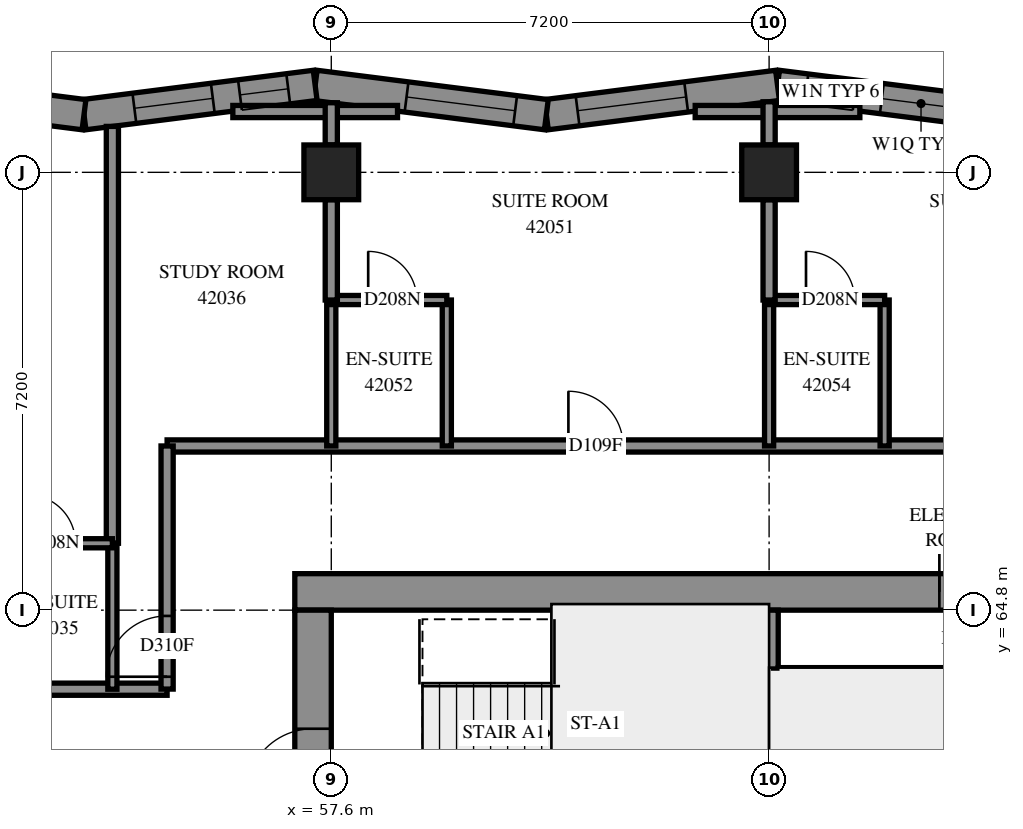
"""IFC4 building model, lengths in metres.
Left out: names, types, materials, properties, quantities, classifications, styles, units other than length and angle.
Written with IfcOpenShell. Run it as: python <this file> out.ifc"""

import sys

from ifc_helpers import new_model, si_unit, direction, frame, frame_2d, origin, origin_2d, place, context, subcontext, project, spatial, polyline, rectangle, outline, extrude, element, fill, save


model = new_model("IFC4")
c1 = context("Model", 3, precision=1e-05, world=origin(), true_north=direction((0.0, 1.0)))
c2 = subcontext(c1, "Body", "Model", "MODEL_VIEW")
j1 = project(units=[si_unit("LENGTHUNIT", "METRE"), si_unit("PLANEANGLEUNIT", "RADIAN")], contexts=[c1])
p1 = place(None, origin())
s1 = spatial("IfcSite", under=j1, at=p1, CompositionType="ELEMENT")
p2 = place(p1, origin())
s2 = spatial("IfcBuilding", under=s1, at=p2, CompositionType="ELEMENT")
p3 = place(p2, frame((0.0, 0.0, 155.8)))
s3 = spatial("IfcBuildingStorey", under=s2, at=p3, CompositionType="ELEMENT", Elevation=155.8)
for number, where, z_axis, x_axis in (
    (1, (57.6, 72.0, 0.0), (0.0, 0.0, 1.0), (1.0, 0.0, 0.0)),
    (2, (64.8, 72.0, 0.0), (0.0, 0.0, 1.0), (1.0, 0.0, 0.0)),
):
    element("IfcColumn", number, at=place(p3, frame(where, z_axis=z_axis, x_axis=x_axis)), inside=s3, PredefinedType="COLUMN", context=c2, shape_type="SweptSolid", body=[
        extrude(rectangle(XDim=0.9, YDim=0.9, at=origin_2d()), origin(), (0.0, 0.0, 1.0), 3.1),
    ])
p4 = place(p3, frame((57.0, 65.1, -0.3), z_axis=(0.0, 0.0, 1.0), x_axis=(1.0, 0.0, 0.0)))
e3 = element("IfcWall", 3, at=p4, inside=s3, PredefinedType="SHEAR", context=c2, shape_type="SweptSolid", body=[
    extrude(rectangle(XDim=15.6, YDim=0.6, at=frame_2d((7.8, 0.0))), origin(), (0.0, 0.0, 1.0), 2.7),
])
p5 = place(p4, frame((10.6, 0.0, 0.3)))
e4 = element("IfcOpeningElement", 4, at=p5, cuts=e3, PredefinedType="OPENING", context=c2, shape_type="SweptSolid", body=[
    extrude(rectangle(XDim=0.8, YDim=2.1, at=frame_2d((0.4, 1.05))), frame((0.0, 0.31, 0.0), z_axis=(0.0, -1.0, 0.0), x_axis=(1.0, 0.0, 0.0)), (0.0, 0.0, 1.0), 0.62),
])
p6 = place(p3, frame((57.3, 50.4, -0.3), z_axis=(0.0, 0.0, 1.0), x_axis=(0.0, 1.0, 0.0)))
e5 = element("IfcWall", 5, at=p6, inside=s3, PredefinedType="SHEAR", context=c2, shape_type="SweptSolid", body=[
    extrude(rectangle(XDim=14.4, YDim=0.6, at=frame_2d((7.2, 0.0))), origin(), (0.0, 0.0, 1.0), 2.7),
])
p7 = place(p6, frame((4.55, 0.0, 0.3)))
e6 = element("IfcOpeningElement", 6, at=p7, cuts=e5, PredefinedType="OPENING", context=c2, shape_type="SweptSolid", body=[
    extrude(rectangle(XDim=1.1, YDim=2.1, at=frame_2d((0.55, 1.05))), frame((0.0, 0.31, 0.0), z_axis=(0.0, -1.0, 0.0), x_axis=(1.0, 0.0, 0.0)), (0.0, 0.0, 1.0), 0.62),
])
p8 = place(p6, frame((11.35, 0.0, 0.3)))
e7 = element("IfcOpeningElement", 7, at=p8, cuts=e5, PredefinedType="OPENING", context=c2, shape_type="SweptSolid", body=[
    extrude(rectangle(XDim=1.1, YDim=2.1, at=frame_2d((0.55, 1.05))), frame((0.0, 0.31, 0.0), z_axis=(0.0, -1.0, 0.0), x_axis=(1.0, 0.0, 0.0)), (0.0, 0.0, 1.0), 0.62),
])
p9 = place(p3, frame((64.8, 60.6, 0.0), z_axis=(0.0, 0.0, 1.0), x_axis=(0.0, 1.0, 0.0)))
e8 = element("IfcWall", 8, at=p9, inside=s3, PredefinedType="SOLIDWALL", context=c2, shape_type="SweptSolid", body=[
    extrude(rectangle(XDim=4.2, YDim=0.3, at=frame_2d((2.1, 0.0))), origin(), (0.0, 0.0, 1.0), 3.1),
])
p10 = place(p3, frame((68.74, 72.948, 0.0), z_axis=(0.0, 0.0, 1.0), x_axis=(-0.9920583495, 0.1257785003, 0.0)))
e9 = element("IfcWall", 9, at=p10, inside=s3, PredefinedType="SOLIDWALL", context=c2, shape_type="SweptSolid", body=[
    extrude(outline(polyline([(0.032, -0.25), (3.864, -0.25), (3.8, 0.25), (-0.032, 0.25), (0.032, -0.25)])), origin(), (0.0, 0.0, 1.0), 3.1),
])
p11 = place(p10, frame((0.803, 0.0, 0.45)))
e10 = element("IfcOpeningElement", 10, at=p11, cuts=e9, PredefinedType="OPENING", context=c2, shape_type="SweptSolid", body=[
    extrude(rectangle(XDim=1.3, YDim=2.5, at=frame_2d((0.65, 1.25))), frame((0.0, 0.26, 0.0), z_axis=(0.0, -1.0, 0.0), x_axis=(1.0, 0.0, 0.0)), (0.0, 0.0, 1.0), 0.52),
])
p12 = place(p10, frame((2.553, 0.0, 0.45)))
e11 = element("IfcOpeningElement", 11, at=p12, cuts=e9, PredefinedType="OPENING", context=c2, shape_type="SweptSolid", body=[
    extrude(rectangle(XDim=0.8, YDim=2.5, at=frame_2d((0.4, 1.25))), frame((0.0, 0.26, 0.0), z_axis=(0.0, -1.0, 0.0), x_axis=(1.0, 0.0, 0.0)), (0.0, 0.0, 1.0), 0.52),
])
p13 = place(p3, frame((64.939, 73.43, 0.0), z_axis=(0.0, 0.0, 1.0), x_axis=(-0.9920583495, -0.1257785003, 0.0)))
e12 = element("IfcWall", 12, at=p13, inside=s3, PredefinedType="SOLIDWALL", context=c2, shape_type="SweptSolid", body=[
    extrude(outline(polyline([(-0.032, -0.25), (3.8, -0.25), (3.864, 0.25), (0.032, 0.25), (-0.032, -0.25)])), origin(), (0.0, 0.0, 1.0), 3.1),
])
p14 = place(p13, frame((1.515, 0.0, 0.7)))
e13 = element("IfcOpeningElement", 13, at=p14, cuts=e12, PredefinedType="OPENING", context=c2, shape_type="SweptSolid", body=[
    extrude(rectangle(XDim=1.8, YDim=2.2, at=frame_2d((0.9, 1.1))), frame((0.0, 0.26, 0.0), z_axis=(0.0, -1.0, 0.0), x_axis=(1.0, 0.0, 0.0)), (0.0, 0.0, 1.0), 0.52),
])
p15 = place(p3, frame((61.137, 72.948, 0.0), z_axis=(0.0, 0.0, 1.0), x_axis=(-0.9920587623, 0.1257752442, 0.0)))
e14 = element("IfcWall", 14, at=p15, inside=s3, PredefinedType="SOLIDWALL", context=c2, shape_type="SweptSolid", body=[
    extrude(outline(polyline([(0.032, -0.25), (3.864, -0.25), (3.8, 0.25), (-0.032, 0.25), (0.032, -0.25)])), origin(), (0.0, 0.0, 1.0), 3.1),
])
p16 = place(p15, frame((0.517, 0.0, 0.7)))
e15 = element("IfcOpeningElement", 15, at=p16, cuts=e14, PredefinedType="OPENING", context=c2, shape_type="SweptSolid", body=[
    extrude(rectangle(XDim=1.8, YDim=2.2, at=frame_2d((0.9, 1.1))), frame((0.0, 0.26, 0.0), z_axis=(0.0, -1.0, 0.0), x_axis=(1.0, 0.0, 0.0)), (0.0, 0.0, 1.0), 0.52),
])
p17 = place(p3, frame((57.335, 73.43, 0.0), z_axis=(0.0, 0.0, 1.0), x_axis=(-0.9920583495, -0.1257785003, 0.0)))
e16 = element("IfcWall", 16, at=p17, inside=s3, PredefinedType="SOLIDWALL", context=c2, shape_type="SweptSolid", body=[
    extrude(outline(polyline([(-0.032, -0.25), (3.8, -0.25), (3.864, 0.25), (0.032, 0.25), (-0.032, -0.25)])), origin(), (0.0, 0.0, 1.0), 3.1),
])
p18 = place(p17, frame((0.447, 0.0, 0.45)))
e17 = element("IfcOpeningElement", 17, at=p18, cuts=e16, PredefinedType="OPENING", context=c2, shape_type="SweptSolid", body=[
    extrude(rectangle(XDim=0.8, YDim=2.5, at=frame_2d((0.4, 1.25))), frame((0.0, 0.26, 0.0), z_axis=(0.0, -1.0, 0.0), x_axis=(1.0, 0.0, 0.0)), (0.0, 0.0, 1.0), 0.52),
])
p19 = place(p17, frame((1.697, 0.0, 0.45)))
e18 = element("IfcOpeningElement", 18, at=p19, cuts=e16, PredefinedType="OPENING", context=c2, shape_type="SweptSolid", body=[
    extrude(rectangle(XDim=1.3, YDim=2.5, at=frame_2d((0.65, 1.25))), frame((0.0, 0.26, 0.0), z_axis=(0.0, -1.0, 0.0), x_axis=(1.0, 0.0, 0.0)), (0.0, 0.0, 1.0), 0.52),
])
p20 = place(p3, frame((53.533, 72.948, 0.0), z_axis=(0.0, 0.0, 1.0), x_axis=(-0.9920583495, 0.1257785003, 0.0)))
e19 = element("IfcWall", 19, at=p20, inside=s3, PredefinedType="SOLIDWALL", context=c2, shape_type="SweptSolid", body=[
    extrude(outline(polyline([(0.032, -0.25), (3.864, -0.25), (3.8, 0.25), (-0.032, 0.25), (0.032, -0.25)])), origin(), (0.0, 0.0, 1.0), 3.1),
])
p21 = place(p20, frame((1.079, 0.0, 0.45)))
e20 = element("IfcOpeningElement", 20, at=p21, cuts=e19, PredefinedType="OPENING", context=c2, shape_type="SweptSolid", body=[
    extrude(rectangle(XDim=1.2, YDim=2.5, at=frame_2d((0.6, 1.25))), frame((0.0, 0.26, 0.0), z_axis=(0.0, -1.0, 0.0), x_axis=(1.0, 0.0, 0.0)), (0.0, 0.0, 1.0), 0.52),
])
p22 = place(p3, frame((64.95, 63.78, 0.0), z_axis=(0.0, 0.0, 1.0), x_axis=(1.0, 0.0, 0.0)))
e21 = element("IfcWall", 21, at=p22, inside=s3, PredefinedType="PARTITIONING", context=c2, shape_type="SweptSolid", body=[
    extrude(rectangle(XDim=6.25, YDim=0.15, at=frame_2d((3.125, 0.0))), origin(), (0.0, 0.0, 1.0), 3.1),
])
p23 = place(p3, frame((54.9, 67.5, 0.0), z_axis=(0.0, 0.0, 1.0), x_axis=(1.0, 0.0, 0.0)))
e22 = element("IfcWall", 22, at=p23, inside=s3, PredefinedType="PARTITIONING", context=c2, shape_type="SweptSolid", body=[
    extrude(rectangle(XDim=19.8, YDim=0.2, at=frame_2d((9.9, 0.0))), origin(), (0.0, 0.0, 1.0), 3.1),
])
p24 = place(p23, frame((6.599, 0.0, 0.0)))
e23 = element("IfcOpeningElement", 23, at=p24, cuts=e22, PredefinedType="OPENING", context=c2, shape_type="SweptSolid", body=[
    extrude(rectangle(XDim=0.9, YDim=2.1, at=frame_2d((0.45, 1.05))), frame((0.0, 0.11, 0.0), z_axis=(0.0, -1.0, 0.0), x_axis=(1.0, 0.0, 0.0)), (0.0, 0.0, 1.0), 0.22),
])
p25 = place(p23, frame((13.799, 0.0, 0.0)))
e24 = element("IfcOpeningElement", 24, at=p25, cuts=e22, PredefinedType="OPENING", context=c2, shape_type="SweptSolid", body=[
    extrude(rectangle(XDim=0.9, YDim=2.1, at=frame_2d((0.45, 1.05))), frame((0.0, 0.11, 0.0), z_axis=(0.0, -1.0, 0.0), x_axis=(1.0, 0.0, 0.0)), (0.0, 0.0, 1.0), 0.22),
])
p26 = place(p3, frame((40.702, 63.5, 0.0), z_axis=(0.0, 0.0, 1.0), x_axis=(1.0, 0.0, 0.0)))
e25 = element("IfcWall", 25, at=p26, inside=s3, PredefinedType="PARTITIONING", context=c2, shape_type="SweptSolid", body=[
    extrude(rectangle(XDim=14.198, YDim=0.2, at=frame_2d((7.099, 0.0))), origin(), (0.0, 0.0, 1.0), 3.1),
])
p27 = place(p26, frame((6.692, 0.0, 0.0)))
e26 = element("IfcOpeningElement", 26, at=p27, cuts=e25, PredefinedType="OPENING", context=c2, shape_type="SweptSolid", body=[
    extrude(rectangle(XDim=0.9, YDim=2.1, at=frame_2d((0.45, 1.05))), frame((0.0, 0.11, 0.0), z_axis=(0.0, -1.0, 0.0), x_axis=(1.0, 0.0, 0.0)), (0.0, 0.0, 1.0), 0.22),
])
p28 = place(p26, frame((10.25, 0.0, 0.0)))
e27 = element("IfcOpeningElement", 27, at=p28, cuts=e25, PredefinedType="OPENING", context=c2, shape_type="SweptSolid", body=[
    extrude(rectangle(XDim=0.9, YDim=2.1, at=frame_2d((0.45, 1.05))), frame((0.0, 0.11, 0.0), z_axis=(0.0, -1.0, 0.0), x_axis=(1.0, 0.0, 0.0)), (0.0, 0.0, 1.0), 0.22),
])
p29 = place(p3, frame((54.0, 65.9, 0.0), z_axis=(0.0, 0.0, 1.0), x_axis=(0.0, 1.0, 0.0)))
e28 = element("IfcWall", 28, at=p29, inside=s3, PredefinedType="PARTITIONING", context=c2, shape_type="SweptSolid", body=[
    extrude(rectangle(XDim=6.855, YDim=0.2, at=frame_2d((3.428, 0.0))), origin(), (0.0, 0.0, 1.0), 3.1),
])
p30 = place(p3, frame((54.9, 63.502, 0.0), z_axis=(0.0, 0.0, 1.0), x_axis=(0.0, 1.0, 0.0)))
e29 = element("IfcWall", 29, at=p30, inside=s3, PredefinedType="PARTITIONING", context=c2, shape_type="SweptSolid", body=[
    extrude(rectangle(XDim=3.998, YDim=0.2, at=frame_2d((1.999, 0.0))), origin(), (0.0, 0.0, 1.0), 3.1),
])
p31 = place(p30, frame((0.203, 0.0, 0.0)))
e30 = element("IfcOpeningElement", 30, at=p31, cuts=e29, PredefinedType="OPENING", context=c2, shape_type="SweptSolid", body=[
    extrude(rectangle(XDim=1.0, YDim=2.1, at=frame_2d((0.5, 1.05))), frame((0.0, 0.11, 0.0), z_axis=(0.0, -1.0, 0.0), x_axis=(1.0, 0.0, 0.0)), (0.0, 0.0, 1.0), 0.22),
])
for number, where, z_axis, x_axis in (
    (31, (63.584, 73.0, 0.0), (0.0, 0.0, 1.0), (1.0, 0.0, 0.0)),
    (32, (55.981, 73.0, 0.0), (0.0, 0.0, 1.0), (1.0, 0.0, 0.0)),
):
    element("IfcWall", number, at=place(p3, frame(where, z_axis=z_axis, x_axis=x_axis)), inside=s3, PredefinedType="PARTITIONING", context=c2, shape_type="SweptSolid", body=[
        extrude(rectangle(XDim=2.708, YDim=0.2, at=frame_2d((1.354, 0.0))), origin(), (0.0, 0.0, 1.0), 3.1),
    ])
for number, where, z_axis, x_axis in (
    (33, (54.0, 63.5, 0.0), (0.0, 0.0, 1.0), (0.0, 1.0, 0.0)),
    (34, (59.5, 67.5, 0.0), (0.0, 0.0, 1.0), (0.0, 1.0, 0.0)),
    (35, (57.6, 67.5, 0.0), (0.0, 0.0, 1.0), (0.0, 1.0, 0.0)),
    (36, (66.7, 67.5, 0.0), (0.0, 0.0, 1.0), (0.0, 1.0, 0.0)),
    (37, (64.8, 67.5, 0.0), (0.0, 0.0, 1.0), (0.0, 1.0, 0.0)),
):
    element("IfcWall", number, at=place(p3, frame(where, z_axis=z_axis, x_axis=x_axis)), inside=s3, PredefinedType="PARTITIONING", context=c2, shape_type="SweptSolid", body=[
        extrude(rectangle(XDim=2.4, YDim=0.15, at=frame_2d((1.2, 0.0))), origin(), (0.0, 0.0, 1.0), 3.1),
    ])
p32 = place(p3, frame((64.8, 69.9, 0.0), z_axis=(0.0, 0.0, 1.0), x_axis=(1.0, 0.0, 0.0)))
e38 = element("IfcWall", 38, at=p32, inside=s3, PredefinedType="PARTITIONING", context=c2, shape_type="SweptSolid", body=[
    extrude(rectangle(XDim=1.9, YDim=0.15, at=frame_2d((0.95, 0.0))), origin(), (0.0, 0.0, 1.0), 3.1),
])
p33 = place(p32, frame((0.607, 0.0, 0.0)))
e39 = element("IfcOpeningElement", 39, at=p33, cuts=e38, PredefinedType="OPENING", context=c2, shape_type="SweptSolid", body=[
    extrude(rectangle(XDim=0.8, YDim=2.1, at=frame_2d((0.4, 1.05))), frame((0.0, 0.085, 0.0), z_axis=(0.0, -1.0, 0.0), x_axis=(1.0, 0.0, 0.0)), (0.0, 0.0, 1.0), 0.17),
])
p34 = place(p3, frame((52.1, 65.9, 0.0), z_axis=(0.0, 0.0, 1.0), x_axis=(1.0, 0.0, 0.0)))
e40 = element("IfcWall", 40, at=p34, inside=s3, PredefinedType="PARTITIONING", context=c2, shape_type="SweptSolid", body=[
    extrude(rectangle(XDim=1.9, YDim=0.15, at=frame_2d((0.95, 0.0))), origin(), (0.0, 0.0, 1.0), 3.1),
])
p35 = place(p34, frame((0.493, 0.0, 0.0)))
e41 = element("IfcOpeningElement", 41, at=p35, cuts=e40, PredefinedType="OPENING", context=c2, shape_type="SweptSolid", body=[
    extrude(rectangle(XDim=0.8, YDim=2.1, at=frame_2d((0.4, 1.05))), frame((0.0, 0.085, 0.0), z_axis=(0.0, -1.0, 0.0), x_axis=(1.0, 0.0, 0.0)), (0.0, 0.0, 1.0), 0.17),
])
p36 = place(p3, frame((57.6, 69.9, 0.0), z_axis=(0.0, 0.0, 1.0), x_axis=(1.0, 0.0, 0.0)))
e42 = element("IfcWall", 42, at=p36, inside=s3, PredefinedType="PARTITIONING", context=c2, shape_type="SweptSolid", body=[
    extrude(rectangle(XDim=1.9, YDim=0.15, at=frame_2d((0.95, 0.0))), origin(), (0.0, 0.0, 1.0), 3.1),
])
p37 = place(p36, frame((0.607, 0.0, 0.0)))
e43 = element("IfcOpeningElement", 43, at=p37, cuts=e42, PredefinedType="OPENING", context=c2, shape_type="SweptSolid", body=[
    extrude(rectangle(XDim=0.8, YDim=2.1, at=frame_2d((0.4, 1.05))), frame((0.0, 0.085, 0.0), z_axis=(0.0, -1.0, 0.0), x_axis=(1.0, 0.0, 0.0)), (0.0, 0.0, 1.0), 0.17),
])
for number, where, z_axis, x_axis in (
    (44, (57.6, 69.9, 0.0), (0.0, 0.0, 1.0), (0.0, 1.0, 0.0)),
    (45, (64.8, 69.9, 0.0), (0.0, 0.0, 1.0), (0.0, 1.0, 0.0)),
):
    element("IfcWall", number, at=place(p3, frame(where, z_axis=z_axis, x_axis=x_axis)), inside=s3, PredefinedType="PARTITIONING", context=c2, shape_type="SweptSolid", body=[
        extrude(rectangle(XDim=1.65, YDim=0.2, at=frame_2d((0.825, 0.0))), origin(), (0.0, 0.0, 1.0), 3.1),
    ])
p38 = place(p3, frame((57.6, 72.45, 0.0), z_axis=(0.0, 0.0, 1.0), x_axis=(0.0, 1.0, 0.0)))
e46 = element("IfcWall", 46, at=p38, inside=s3, PredefinedType="PARTITIONING", context=c2, shape_type="SweptSolid", body=[
    extrude(rectangle(XDim=0.694, YDim=0.2, at=frame_2d((0.347, 0.0))), origin(), (0.0, 0.0, 1.0), 3.1),
])
p39 = place(p3, frame((64.8, 72.45, 0.0), z_axis=(0.0, 0.0, 1.0), x_axis=(0.0, 1.0, 0.0)))
e47 = element("IfcWall", 47, at=p39, inside=s3, PredefinedType="PARTITIONING", context=c2, shape_type="SweptSolid", body=[
    extrude(rectangle(XDim=0.71, YDim=0.2, at=frame_2d((0.355, 0.0))), origin(), (0.0, 0.0, 1.0), 3.1),
])
p40 = place(p5, origin())
e48 = element("IfcDoor", 48, at=p40, inside=s3, OperationType="SINGLE_SWING_RIGHT", PredefinedType="DOOR", context=c2, shape_type="SweptSolid", body=[
    extrude(rectangle(XDim=0.8, YDim=2.1, at=frame_2d((0.4, 1.05))), frame((0.0, 0.025, 0.0), z_axis=(0.0, -1.0, 0.0), x_axis=(1.0, 0.0, 0.0)), (0.0, 0.0, 1.0), 0.05),
])
fill(e4, e48)
p41 = place(p8, origin())
e49 = element("IfcDoor", 49, at=p41, inside=s3, OperationType="SINGLE_SWING_LEFT", PredefinedType="DOOR", context=c2, shape_type="SweptSolid", body=[
    extrude(rectangle(XDim=1.1, YDim=2.1, at=frame_2d((0.55, 1.05))), frame((0.0, 0.025, 0.0), z_axis=(0.0, -1.0, 0.0), x_axis=(1.0, 0.0, 0.0)), (0.0, 0.0, 1.0), 0.05),
])
fill(e7, e49)
p42 = place(p35, origin())
e50 = element("IfcDoor", 50, at=p42, inside=s3, OperationType="SINGLE_SWING_RIGHT", PredefinedType="DOOR", context=c2, shape_type="SweptSolid", body=[
    extrude(rectangle(XDim=0.8, YDim=2.1, at=frame_2d((0.4, 1.05))), frame((0.0, 0.025, 0.0), z_axis=(0.0, -1.0, 0.0), x_axis=(1.0, 0.0, 0.0)), (0.0, 0.0, 1.0), 0.05),
])
fill(e41, e50)
p43 = place(p31, origin())
e51 = element("IfcDoor", 51, at=p43, inside=s3, OperationType="SINGLE_SWING_LEFT", PredefinedType="DOOR", context=c2, shape_type="SweptSolid", body=[
    extrude(rectangle(XDim=1.0, YDim=2.1, at=frame_2d((0.5, 1.05))), frame((0.0, 0.025, 0.0), z_axis=(0.0, -1.0, 0.0), x_axis=(1.0, 0.0, 0.0)), (0.0, 0.0, 1.0), 0.05),
])
fill(e30, e51)
p44 = place(p24, origin())
e52 = element("IfcDoor", 52, at=p44, inside=s3, OperationType="SINGLE_SWING_RIGHT", PredefinedType="DOOR", context=c2, shape_type="SweptSolid", body=[
    extrude(rectangle(XDim=0.9, YDim=2.1, at=frame_2d((0.45, 1.05))), frame((0.0, 0.025, 0.0), z_axis=(0.0, -1.0, 0.0), x_axis=(1.0, 0.0, 0.0)), (0.0, 0.0, 1.0), 0.05),
])
fill(e23, e52)
p45 = place(p37, origin())
e53 = element("IfcDoor", 53, at=p45, inside=s3, OperationType="SINGLE_SWING_RIGHT", PredefinedType="DOOR", context=c2, shape_type="SweptSolid", body=[
    extrude(rectangle(XDim=0.8, YDim=2.1, at=frame_2d((0.4, 1.05))), frame((0.0, 0.025, 0.0), z_axis=(0.0, -1.0, 0.0), x_axis=(1.0, 0.0, 0.0)), (0.0, 0.0, 1.0), 0.05),
])
fill(e43, e53)
p46 = place(p33, origin())
e54 = element("IfcDoor", 54, at=p46, inside=s3, OperationType="SINGLE_SWING_RIGHT", PredefinedType="DOOR", context=c2, shape_type="SweptSolid", body=[
    extrude(rectangle(XDim=0.8, YDim=2.1, at=frame_2d((0.4, 1.05))), frame((0.0, 0.025, 0.0), z_axis=(0.0, -1.0, 0.0), x_axis=(1.0, 0.0, 0.0)), (0.0, 0.0, 1.0), 0.05),
])
fill(e39, e54)
p47 = place(p11, origin())
e55 = element("IfcWindow", 55, at=p47, inside=s3, PartitioningType="SINGLE_PANEL", PredefinedType="WINDOW", context=c2, shape_type="SweptSolid", body=[
    extrude(rectangle(XDim=1.3, YDim=2.5, at=frame_2d((0.65, 1.25))), frame((0.0, 0.18, 0.0), z_axis=(0.0, -1.0, 0.0), x_axis=(1.0, 0.0, 0.0)), (0.0, 0.0, 1.0), 0.06),
])
fill(e10, e55)
p48 = place(p12, origin())
e56 = element("IfcWindow", 56, at=p48, inside=s3, PartitioningType="SINGLE_PANEL", PredefinedType="WINDOW", context=c2, shape_type="SweptSolid", body=[
    extrude(rectangle(XDim=0.8, YDim=2.5, at=frame_2d((0.4, 1.25))), frame((0.0, 0.14, 0.0), z_axis=(0.0, -1.0, 0.0), x_axis=(1.0, 0.0, 0.0)), (0.0, 0.0, 1.0), 0.06),
])
fill(e11, e56)
p49 = place(p14, origin())
e57 = element("IfcWindow", 57, at=p49, inside=s3, PartitioningType="SINGLE_PANEL", PredefinedType="WINDOW", context=c2, shape_type="SweptSolid", body=[
    extrude(rectangle(XDim=1.8, YDim=2.2, at=frame_2d((0.9, 1.1))), frame((0.0, 0.18, 0.0), z_axis=(0.0, -1.0, 0.0), x_axis=(1.0, 0.0, 0.0)), (0.0, 0.0, 1.0), 0.06),
])
fill(e13, e57)
p50 = place(p16, origin())
e58 = element("IfcWindow", 58, at=p50, inside=s3, PartitioningType="SINGLE_PANEL", PredefinedType="WINDOW", context=c2, shape_type="SweptSolid", body=[
    extrude(rectangle(XDim=1.8, YDim=2.2, at=frame_2d((0.9, 1.1))), frame((0.0, 0.18, 0.0), z_axis=(0.0, -1.0, 0.0), x_axis=(1.0, 0.0, 0.0)), (0.0, 0.0, 1.0), 0.06),
])
fill(e15, e58)
p51 = place(p18, origin())
e59 = element("IfcWindow", 59, at=p51, inside=s3, PartitioningType="SINGLE_PANEL", PredefinedType="WINDOW", context=c2, shape_type="SweptSolid", body=[
    extrude(rectangle(XDim=0.8, YDim=2.5, at=frame_2d((0.4, 1.25))), frame((0.0, 0.14, 0.0), z_axis=(0.0, -1.0, 0.0), x_axis=(1.0, 0.0, 0.0)), (0.0, 0.0, 1.0), 0.06),
])
fill(e17, e59)
p52 = place(p19, origin())
e60 = element("IfcWindow", 60, at=p52, inside=s3, PartitioningType="SINGLE_PANEL", PredefinedType="WINDOW", context=c2, shape_type="SweptSolid", body=[
    extrude(rectangle(XDim=1.3, YDim=2.5, at=frame_2d((0.65, 1.25))), frame((0.0, 0.18, 0.0), z_axis=(0.0, -1.0, 0.0), x_axis=(1.0, 0.0, 0.0)), (0.0, 0.0, 1.0), 0.06),
])
fill(e18, e60)
save(model, sys.argv[1])
